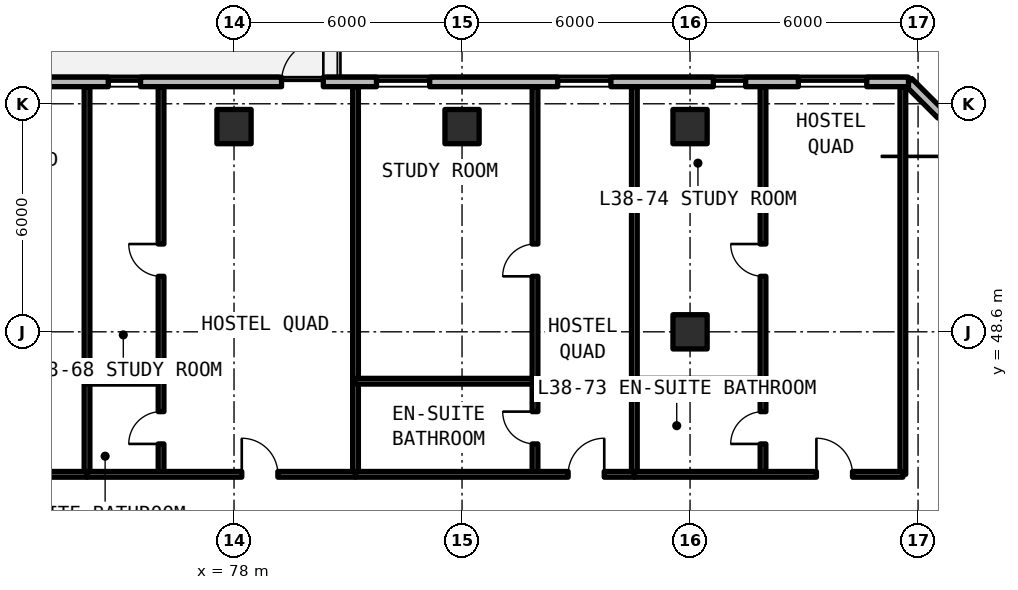
"""IFC4 building model, lengths in metres.
Left out: names, types, materials, properties, quantities, classifications, styles, units other than length and angle.
Written with IfcOpenShell. Run it as: python <this file> out.ifc"""

import sys

from ifc_helpers import new_model, si_unit, direction, frame, frame_2d, origin, origin_2d, place, context, subcontext, project, spatial, rectangle, extrude, element, fill, save


model = new_model("IFC4")
c1 = context("Model", 3, precision=1e-05, world=origin(), true_north=direction((0.0, 1.0)))
c2 = subcontext(c1, "Body", "Model", "MODEL_VIEW")
j1 = project(units=[si_unit("LENGTHUNIT", "METRE"), si_unit("PLANEANGLEUNIT", "RADIAN")], contexts=[c1])
p1 = place(None, origin())
s1 = spatial("IfcSite", under=j1, at=p1, CompositionType="ELEMENT")
p2 = place(p1, origin())
s2 = spatial("IfcBuilding", under=s1, at=p2, CompositionType="ELEMENT")
p3 = place(p2, frame((0.0, 0.0, 138.6)))
s3 = spatial("IfcBuildingStorey", under=s2, at=p3, CompositionType="ELEMENT", Elevation=138.6)
for number, where, z_axis, x_axis in (
    (1, (90.0, 48.6, 0.0), (0.0, 0.0, 1.0), (1.0, 0.0, 0.0)),
    (2, (78.0, 54.0, 0.0), (0.0, 0.0, 1.0), (1.0, 0.0, 0.0)),
    (3, (84.0, 54.0, 0.0), (0.0, 0.0, 1.0), (1.0, 0.0, 0.0)),
    (4, (90.0, 54.0, 0.0), (0.0, 0.0, 1.0), (1.0, 0.0, 0.0)),
):
    element("IfcColumn", number, at=place(p3, frame(where, z_axis=z_axis, x_axis=x_axis)), inside=s3, PredefinedType="COLUMN", context=c2, shape_type="SweptSolid", body=[
        extrude(rectangle(XDim=0.9, YDim=0.9, at=origin_2d()), origin(), (0.0, 0.0, 1.0), 3.3),
    ])
p4 = place(p3, frame((99.875, 51.048, 0.0), z_axis=(0.0, 0.0, 1.0), x_axis=(-0.70708586489, 0.707127696864, 0.0)))
e5 = element("IfcWall", 5, at=p4, inside=s3, PredefinedType="SOLIDWALL", context=c2, shape_type="SweptSolid", body=[
    extrude(rectangle(XDim=5.836, YDim=0.25, at=frame_2d((2.918, 0.0))), origin(), (0.0, 0.0, 1.0), 3.08),
])
p5 = place(p4, frame((1.218, 0.0, 0.78)))
e6 = element("IfcOpeningElement", 6, at=p5, cuts=e5, PredefinedType="OPENING", context=c2, shape_type="SweptSolid", body=[
    extrude(rectangle(XDim=3.4, YDim=1.66, at=frame_2d((1.7, 0.83))), frame((0.0, 0.135, 0.0), z_axis=(0.0, -1.0, 0.0), x_axis=(1.0, 0.0, 0.0)), (0.0, 0.0, 1.0), 0.27),
])
p6 = place(p3, frame((95.748, 55.175, 0.0), z_axis=(0.0, 0.0, 1.0), x_axis=(-1.0, 0.0, 0.0)))
e7 = element("IfcWall", 7, at=p6, inside=s3, PredefinedType="SOLIDWALL", context=c2, shape_type="SweptSolid", body=[
    extrude(rectangle(XDim=43.623, YDim=0.25, at=frame_2d((21.812, 0.0))), origin(), (0.0, 0.0, 1.0), 3.08),
])
p7 = place(p6, frame((31.598, 0.0, 0.0)))
e8 = element("IfcOpeningElement", 8, at=p7, cuts=e7, PredefinedType="OPENING", context=c2, shape_type="SweptSolid", body=[
    extrude(rectangle(XDim=1.1, YDim=2.15, at=frame_2d((0.55, 1.075))), frame((0.0, 0.135, 0.0), z_axis=(0.0, -1.0, 0.0), x_axis=(1.0, 0.0, 0.0)), (0.0, 0.0, 1.0), 0.27),
])
p8 = place(p6, frame((15.398, 0.0, 0.0)))
e9 = element("IfcOpeningElement", 9, at=p8, cuts=e7, PredefinedType="OPENING", context=c2, shape_type="SweptSolid", body=[
    extrude(rectangle(XDim=1.1, YDim=2.15, at=frame_2d((0.55, 1.075))), frame((0.0, 0.135, 0.0), z_axis=(0.0, -1.0, 0.0), x_axis=(1.0, 0.0, 0.0)), (0.0, 0.0, 1.0), 0.27),
])
p9 = place(p6, frame((40.333, 0.0, 0.78)))
e10 = element("IfcOpeningElement", 10, at=p9, cuts=e7, PredefinedType="OPENING", context=c2, shape_type="SweptSolid", body=[
    extrude(rectangle(XDim=0.85, YDim=1.65, at=frame_2d((0.425, 0.825))), frame((0.0, 0.135, 0.0), z_axis=(0.0, -1.0, 0.0), x_axis=(1.0, 0.0, 0.0)), (0.0, 0.0, 1.0), 0.27),
])
p10 = place(p6, frame((37.17, 0.0, 0.78)))
e11 = element("IfcOpeningElement", 11, at=p10, cuts=e7, PredefinedType="OPENING", context=c2, shape_type="SweptSolid", body=[
    extrude(rectangle(XDim=1.8, YDim=1.66, at=frame_2d((0.9, 0.83))), frame((0.0, 0.135, 0.0), z_axis=(0.0, -1.0, 0.0), x_axis=(1.0, 0.0, 0.0)), (0.0, 0.0, 1.0), 0.27),
])
p11 = place(p6, frame((27.615, 0.0, 0.78)))
e12 = element("IfcOpeningElement", 12, at=p11, cuts=e7, PredefinedType="OPENING", context=c2, shape_type="SweptSolid", body=[
    extrude(rectangle(XDim=0.85, YDim=1.65, at=frame_2d((0.425, 0.825))), frame((0.0, 0.135, 0.0), z_axis=(0.0, -1.0, 0.0), x_axis=(1.0, 0.0, 0.0)), (0.0, 0.0, 1.0), 0.27),
])
p12 = place(p6, frame((24.516, 0.0, 0.78)))
e13 = element("IfcOpeningElement", 13, at=p12, cuts=e7, PredefinedType="OPENING", context=c2, shape_type="SweptSolid", body=[
    extrude(rectangle(XDim=1.4, YDim=1.65, at=frame_2d((0.7, 0.825))), frame((0.0, 0.135, 0.0), z_axis=(0.0, -1.0, 0.0), x_axis=(1.0, 0.0, 0.0)), (0.0, 0.0, 1.0), 0.27),
])
p13 = place(p6, frame((20.208, 0.0, 0.78)))
e14 = element("IfcOpeningElement", 14, at=p13, cuts=e7, PredefinedType="OPENING", context=c2, shape_type="SweptSolid", body=[
    extrude(rectangle(XDim=0.85, YDim=1.65, at=frame_2d((0.425, 0.825))), frame((0.0, 0.135, 0.0), z_axis=(0.0, -1.0, 0.0), x_axis=(1.0, 0.0, 0.0)), (0.0, 0.0, 1.0), 0.27),
])
p14 = place(p6, frame((12.6, 0.0, 0.78)))
e15 = element("IfcOpeningElement", 15, at=p14, cuts=e7, PredefinedType="OPENING", context=c2, shape_type="SweptSolid", body=[
    extrude(rectangle(XDim=1.4, YDim=1.65, at=frame_2d((0.7, 0.825))), frame((0.0, 0.135, 0.0), z_axis=(0.0, -1.0, 0.0), x_axis=(1.0, 0.0, 0.0)), (0.0, 0.0, 1.0), 0.27),
])
p15 = place(p6, frame((7.831, 0.0, 0.78)))
e16 = element("IfcOpeningElement", 16, at=p15, cuts=e7, PredefinedType="OPENING", context=c2, shape_type="SweptSolid", body=[
    extrude(rectangle(XDim=1.4, YDim=1.65, at=frame_2d((0.7, 0.825))), frame((0.0, 0.135, 0.0), z_axis=(0.0, -1.0, 0.0), x_axis=(1.0, 0.0, 0.0)), (0.0, 0.0, 1.0), 0.27),
])
p16 = place(p6, frame((4.286, 0.0, 0.78)))
e17 = element("IfcOpeningElement", 17, at=p16, cuts=e7, PredefinedType="OPENING", context=c2, shape_type="SweptSolid", body=[
    extrude(rectangle(XDim=0.85, YDim=1.65, at=frame_2d((0.425, 0.825))), frame((0.0, 0.135, 0.0), z_axis=(0.0, -1.0, 0.0), x_axis=(1.0, 0.0, 0.0)), (0.0, 0.0, 1.0), 0.27),
])
p17 = place(p6, frame((1.098, 0.0, 0.78)))
e18 = element("IfcOpeningElement", 18, at=p17, cuts=e7, PredefinedType="OPENING", context=c2, shape_type="SweptSolid", body=[
    extrude(rectangle(XDim=1.8, YDim=1.66, at=frame_2d((0.9, 0.83))), frame((0.0, 0.135, 0.0), z_axis=(0.0, -1.0, 0.0), x_axis=(1.0, 0.0, 0.0)), (0.0, 0.0, 1.0), 0.27),
])
for number, where, z_axis, x_axis in (
    (19, (95.6, 44.85, 0.0), (0.0, 0.0, 1.0), (0.0, 1.0, 0.0)),
    (20, (74.132, 44.85, 0.0), (0.0, 0.0, 1.0), (0.0, 1.0, 0.0)),
):
    element("IfcWall", number, at=place(p3, frame(where, z_axis=z_axis, x_axis=x_axis)), inside=s3, PredefinedType="SOLIDWALL", context=c2, shape_type="SweptSolid", body=[
        extrude(rectangle(XDim=10.2, YDim=0.15, at=frame_2d((5.1, 0.0))), origin(), (0.0, 0.0, 1.0), 2.35),
    ])
p18 = place(p3, frame((66.523, 44.85, 0.0), z_axis=(0.0, 0.0, 1.0), x_axis=(1.0, 0.0, 0.0)))
e21 = element("IfcWall", 21, at=p18, inside=s3, PredefinedType="SOLIDWALL", context=c2, shape_type="SweptSolid", body=[
    extrude(rectangle(XDim=7.609, YDim=0.15, at=frame_2d((3.804, 0.0))), origin(), (0.0, 0.0, 1.0), 2.35),
])
p19 = place(p18, frame((4.544, 0.0, 0.0)))
e22 = element("IfcOpeningElement", 22, at=p19, cuts=e21, PredefinedType="OPENING", context=c2, shape_type="SweptSolid", body=[
    extrude(rectangle(XDim=0.95, YDim=2.15, at=frame_2d((0.475, 1.075))), frame((0.0, 0.085, 0.0), z_axis=(0.0, -1.0, 0.0), x_axis=(1.0, 0.0, 0.0)), (0.0, 0.0, 1.0), 0.17),
])
p20 = place(p3, frame((81.197, 44.85, 0.0), z_axis=(0.0, 0.0, 1.0), x_axis=(0.0, 1.0, 0.0)))
e23 = element("IfcWall", 23, at=p20, inside=s3, PredefinedType="SOLIDWALL", context=c2, shape_type="SweptSolid", body=[
    extrude(rectangle(XDim=10.2, YDim=0.15, at=frame_2d((5.1, 0.0))), origin(), (0.0, 0.0, 1.0), 2.35),
])
p21 = place(p3, frame((74.132, 47.3, 0.0), z_axis=(0.0, 0.0, 1.0), x_axis=(1.0, 0.0, 0.0)))
e24 = element("IfcWall", 24, at=p21, inside=s3, PredefinedType="PARTITIONING", context=c2, shape_type="SweptSolid", body=[
    extrude(rectangle(XDim=1.948, YDim=0.15, at=frame_2d((0.974, 0.0))), origin(), (0.0, 0.0, 1.0), 2.35),
])
p22 = place(p3, frame((76.08, 44.85, 0.0), z_axis=(0.0, 0.0, 1.0), x_axis=(0.0, 1.0, 0.0)))
e25 = element("IfcWall", 25, at=p22, inside=s3, PredefinedType="PARTITIONING", context=c2, shape_type="SweptSolid", body=[
    extrude(rectangle(XDim=10.2, YDim=0.15, at=frame_2d((5.1, 0.0))), origin(), (0.0, 0.0, 1.0), 2.35),
])
p23 = place(p22, frame((0.8, 0.0, 0.0)))
e26 = element("IfcOpeningElement", 26, at=p23, cuts=e25, PredefinedType="OPENING", context=c2, shape_type="SweptSolid", body=[
    extrude(rectangle(XDim=0.85, YDim=2.1, at=frame_2d((0.425, 1.05))), frame((0.0, 0.085, 0.0), z_axis=(0.0, -1.0, 0.0), x_axis=(1.0, 0.0, 0.0)), (0.0, 0.0, 1.0), 0.17),
])
p24 = place(p22, frame((5.21, 0.0, 0.0)))
e27 = element("IfcOpeningElement", 27, at=p24, cuts=e25, PredefinedType="OPENING", context=c2, shape_type="SweptSolid", body=[
    extrude(rectangle(XDim=0.85, YDim=2.1, at=frame_2d((0.425, 1.05))), frame((0.0, 0.085, 0.0), z_axis=(0.0, -1.0, 0.0), x_axis=(1.0, 0.0, 0.0)), (0.0, 0.0, 1.0), 0.17),
])
p25 = place(p3, frame((74.132, 44.85, 0.0), z_axis=(0.0, 0.0, 1.0), x_axis=(1.0, 0.0, 0.0)))
e28 = element("IfcWall", 28, at=p25, inside=s3, PredefinedType="SOLIDWALL", context=c2, shape_type="SweptSolid", body=[
    extrude(rectangle(XDim=7.066, YDim=0.15, at=frame_2d((3.533, 0.0))), origin(), (0.0, 0.0, 1.0), 2.35),
])
p26 = place(p25, frame((4.072, 0.0, 0.0)))
e29 = element("IfcOpeningElement", 29, at=p26, cuts=e28, PredefinedType="OPENING", context=c2, shape_type="SweptSolid", body=[
    extrude(rectangle(XDim=0.95, YDim=2.15, at=frame_2d((0.475, 1.075))), frame((0.0, 0.085, 0.0), z_axis=(0.0, -1.0, 0.0), x_axis=(1.0, 0.0, 0.0)), (0.0, 0.0, 1.0), 0.17),
])
p27 = place(p3, frame((88.534, 44.85, 0.0), z_axis=(0.0, 0.0, 1.0), x_axis=(0.0, 1.0, 0.0)))
e30 = element("IfcWall", 30, at=p27, inside=s3, PredefinedType="SOLIDWALL", context=c2, shape_type="SweptSolid", body=[
    extrude(rectangle(XDim=10.2, YDim=0.15, at=frame_2d((5.1, 0.0))), origin(), (0.0, 0.0, 1.0), 2.35),
])
p28 = place(p3, frame((81.197, 47.3, 0.0), z_axis=(0.0, 0.0, 1.0), x_axis=(1.0, 0.0, 0.0)))
e31 = element("IfcWall", 31, at=p28, inside=s3, PredefinedType="PARTITIONING", context=c2, shape_type="SweptSolid", body=[
    extrude(rectangle(XDim=4.723, YDim=0.15, at=frame_2d((2.361, 0.0))), origin(), (0.0, 0.0, 1.0), 2.35),
])
p29 = place(p3, frame((85.92, 44.85, 0.0), z_axis=(0.0, 0.0, 1.0), x_axis=(0.0, 1.0, 0.0)))
e32 = element("IfcWall", 32, at=p29, inside=s3, PredefinedType="PARTITIONING", context=c2, shape_type="SweptSolid", body=[
    extrude(rectangle(XDim=10.2, YDim=0.15, at=frame_2d((5.1, 0.0))), origin(), (0.0, 0.0, 1.0), 2.35),
])
p30 = place(p29, frame((0.8, 0.0, 0.0)))
e33 = element("IfcOpeningElement", 33, at=p30, cuts=e32, PredefinedType="OPENING", context=c2, shape_type="SweptSolid", body=[
    extrude(rectangle(XDim=0.85, YDim=2.1, at=frame_2d((0.425, 1.05))), frame((0.0, 0.085, 0.0), z_axis=(0.0, -1.0, 0.0), x_axis=(1.0, 0.0, 0.0)), (0.0, 0.0, 1.0), 0.17),
])
p31 = place(p29, frame((5.21, 0.0, 0.0)))
e34 = element("IfcOpeningElement", 34, at=p31, cuts=e32, PredefinedType="OPENING", context=c2, shape_type="SweptSolid", body=[
    extrude(rectangle(XDim=0.85, YDim=2.1, at=frame_2d((0.425, 1.05))), frame((0.0, 0.085, 0.0), z_axis=(0.0, -1.0, 0.0), x_axis=(1.0, 0.0, 0.0)), (0.0, 0.0, 1.0), 0.17),
])
p32 = place(p3, frame((81.197, 44.85, 0.0), z_axis=(0.0, 0.0, 1.0), x_axis=(1.0, 0.0, 0.0)))
e35 = element("IfcWall", 35, at=p32, inside=s3, PredefinedType="SOLIDWALL", context=c2, shape_type="SweptSolid", body=[
    extrude(rectangle(XDim=7.337, YDim=0.15, at=frame_2d((3.668, 0.0))), origin(), (0.0, 0.0, 1.0), 2.35),
])
p33 = place(p32, frame((5.595, 0.0, 0.0)))
e36 = element("IfcOpeningElement", 36, at=p33, cuts=e35, PredefinedType="OPENING", context=c2, shape_type="SweptSolid", body=[
    extrude(rectangle(XDim=0.95, YDim=2.15, at=frame_2d((0.475, 1.075))), frame((0.0, 0.085, 0.0), z_axis=(0.0, -1.0, 0.0), x_axis=(1.0, 0.0, 0.0)), (0.0, 0.0, 1.0), 0.17),
])
p34 = place(p3, frame((88.534, 47.3, 0.0), z_axis=(0.0, 0.0, 1.0), x_axis=(1.0, 0.0, 0.0)))
e37 = element("IfcWall", 37, at=p34, inside=s3, PredefinedType="PARTITIONING", context=c2, shape_type="SweptSolid", body=[
    extrude(rectangle(XDim=3.385, YDim=0.15, at=frame_2d((1.693, 0.0))), origin(), (0.0, 0.0, 1.0), 2.35),
])
p35 = place(p3, frame((91.92, 44.85, 0.0), z_axis=(0.0, 0.0, 1.0), x_axis=(0.0, 1.0, 0.0)))
e38 = element("IfcWall", 38, at=p35, inside=s3, PredefinedType="PARTITIONING", context=c2, shape_type="SweptSolid", body=[
    extrude(rectangle(XDim=10.2, YDim=0.15, at=frame_2d((5.1, 0.0))), origin(), (0.0, 0.0, 1.0), 2.35),
])
p36 = place(p35, frame((0.8, 0.0, 0.0)))
e39 = element("IfcOpeningElement", 39, at=p36, cuts=e38, PredefinedType="OPENING", context=c2, shape_type="SweptSolid", body=[
    extrude(rectangle(XDim=0.85, YDim=2.1, at=frame_2d((0.425, 1.05))), frame((0.0, 0.085, 0.0), z_axis=(0.0, -1.0, 0.0), x_axis=(1.0, 0.0, 0.0)), (0.0, 0.0, 1.0), 0.17),
])
p37 = place(p35, frame((5.21, 0.0, 0.0)))
e40 = element("IfcOpeningElement", 40, at=p37, cuts=e38, PredefinedType="OPENING", context=c2, shape_type="SweptSolid", body=[
    extrude(rectangle(XDim=0.85, YDim=2.1, at=frame_2d((0.425, 1.05))), frame((0.0, 0.085, 0.0), z_axis=(0.0, -1.0, 0.0), x_axis=(1.0, 0.0, 0.0)), (0.0, 0.0, 1.0), 0.17),
])
p38 = place(p3, frame((88.534, 44.85, 0.0), z_axis=(0.0, 0.0, 1.0), x_axis=(1.0, 0.0, 0.0)))
e41 = element("IfcWall", 41, at=p38, inside=s3, PredefinedType="SOLIDWALL", context=c2, shape_type="SweptSolid", body=[
    extrude(rectangle(XDim=7.066, YDim=0.15, at=frame_2d((3.533, 0.0))), origin(), (0.0, 0.0, 1.0), 2.35),
])
p39 = place(p38, frame((4.791, 0.0, 0.0)))
e42 = element("IfcOpeningElement", 42, at=p39, cuts=e41, PredefinedType="OPENING", context=c2, shape_type="SweptSolid", body=[
    extrude(rectangle(XDim=0.95, YDim=2.15, at=frame_2d((0.475, 1.075))), frame((0.0, 0.085, 0.0), z_axis=(0.0, -1.0, 0.0), x_axis=(1.0, 0.0, 0.0)), (0.0, 0.0, 1.0), 0.17),
])
p40 = place(p8, frame((1.1, 0.0, 0.0), z_axis=(0.0, 0.0, 1.0), x_axis=(-1.0, 0.0, 0.0)))
e43 = element("IfcDoor", 43, at=p40, inside=s3, OperationType="SINGLE_SWING_LEFT", PredefinedType="DOOR", context=c2, shape_type="SweptSolid", body=[
    extrude(rectangle(XDim=1.1, YDim=2.15, at=frame_2d((0.55, 1.075))), frame((0.0, 0.025, 0.0), z_axis=(0.0, -1.0, 0.0), x_axis=(1.0, 0.0, 0.0)), (0.0, 0.0, 1.0), 0.05),
])
fill(e9, e43)
p41 = place(p13, origin())
e44 = element("IfcWindow", 44, at=p41, inside=s3, PartitioningType="SINGLE_PANEL", PredefinedType="WINDOW", context=c2, shape_type="SweptSolid", body=[
    extrude(rectangle(XDim=0.85, YDim=1.65, at=frame_2d((0.425, 0.825))), frame((0.0, 0.03, 0.0), z_axis=(0.0, -1.0, 0.0), x_axis=(1.0, 0.0, 0.0)), (0.0, 0.0, 1.0), 0.06),
])
fill(e14, e44)
p42 = place(p14, origin())
e45 = element("IfcWindow", 45, at=p42, inside=s3, PartitioningType="SINGLE_PANEL", PredefinedType="WINDOW", context=c2, shape_type="SweptSolid", body=[
    extrude(rectangle(XDim=1.4, YDim=1.65, at=frame_2d((0.7, 0.825))), frame((0.0, 0.03, 0.0), z_axis=(0.0, -1.0, 0.0), x_axis=(1.0, 0.0, 0.0)), (0.0, 0.0, 1.0), 0.06),
])
fill(e15, e45)
p43 = place(p15, origin())
e46 = element("IfcWindow", 46, at=p43, inside=s3, PartitioningType="SINGLE_PANEL", PredefinedType="WINDOW", context=c2, shape_type="SweptSolid", body=[
    extrude(rectangle(XDim=1.4, YDim=1.65, at=frame_2d((0.7, 0.825))), frame((0.0, 0.03, 0.0), z_axis=(0.0, -1.0, 0.0), x_axis=(1.0, 0.0, 0.0)), (0.0, 0.0, 1.0), 0.06),
])
fill(e16, e46)
p44 = place(p16, origin())
e47 = element("IfcWindow", 47, at=p44, inside=s3, PartitioningType="SINGLE_PANEL", PredefinedType="WINDOW", context=c2, shape_type="SweptSolid", body=[
    extrude(rectangle(XDim=0.85, YDim=1.65, at=frame_2d((0.425, 0.825))), frame((0.0, 0.03, 0.0), z_axis=(0.0, -1.0, 0.0), x_axis=(1.0, 0.0, 0.0)), (0.0, 0.0, 1.0), 0.06),
])
fill(e17, e47)
p45 = place(p17, origin())
e48 = element("IfcWindow", 48, at=p45, inside=s3, PartitioningType="SINGLE_PANEL", PredefinedType="WINDOW", context=c2, shape_type="SweptSolid", body=[
    extrude(rectangle(XDim=1.8, YDim=1.66, at=frame_2d((0.9, 0.83))), frame((0.0, 0.03, 0.0), z_axis=(0.0, -1.0, 0.0), x_axis=(1.0, 0.0, 0.0)), (0.0, 0.0, 1.0), 0.06),
])
fill(e18, e48)
p46 = place(p23, origin())
e49 = element("IfcDoor", 49, at=p46, inside=s3, OperationType="SINGLE_SWING_LEFT", PredefinedType="DOOR", context=c2, shape_type="SweptSolid", body=[
    extrude(rectangle(XDim=0.85, YDim=2.1, at=frame_2d((0.425, 1.05))), frame((0.0, 0.025, 0.0), z_axis=(0.0, -1.0, 0.0), x_axis=(1.0, 0.0, 0.0)), (0.0, 0.0, 1.0), 0.05),
])
fill(e26, e49)
p47 = place(p24, origin())
e50 = element("IfcDoor", 50, at=p47, inside=s3, OperationType="SINGLE_SWING_RIGHT", PredefinedType="DOOR", context=c2, shape_type="SweptSolid", body=[
    extrude(rectangle(XDim=0.85, YDim=2.1, at=frame_2d((0.425, 1.05))), frame((0.0, 0.025, 0.0), z_axis=(0.0, -1.0, 0.0), x_axis=(1.0, 0.0, 0.0)), (0.0, 0.0, 1.0), 0.05),
])
fill(e27, e50)
p48 = place(p26, origin())
e51 = element("IfcDoor", 51, at=p48, inside=s3, OperationType="SINGLE_SWING_LEFT", PredefinedType="DOOR", context=c2, shape_type="SweptSolid", body=[
    extrude(rectangle(XDim=0.95, YDim=2.15, at=frame_2d((0.475, 1.075))), frame((0.0, 0.025, 0.0), z_axis=(0.0, -1.0, 0.0), x_axis=(1.0, 0.0, 0.0)), (0.0, 0.0, 1.0), 0.05),
])
fill(e29, e51)
p49 = place(p30, origin())
e52 = element("IfcDoor", 52, at=p49, inside=s3, OperationType="SINGLE_SWING_RIGHT", PredefinedType="DOOR", context=c2, shape_type="SweptSolid", body=[
    extrude(rectangle(XDim=0.85, YDim=2.1, at=frame_2d((0.425, 1.05))), frame((0.0, 0.025, 0.0), z_axis=(0.0, -1.0, 0.0), x_axis=(1.0, 0.0, 0.0)), (0.0, 0.0, 1.0), 0.05),
])
fill(e33, e52)
p50 = place(p31, origin())
e53 = element("IfcDoor", 53, at=p50, inside=s3, OperationType="SINGLE_SWING_LEFT", PredefinedType="DOOR", context=c2, shape_type="SweptSolid", body=[
    extrude(rectangle(XDim=0.85, YDim=2.1, at=frame_2d((0.425, 1.05))), frame((0.0, 0.025, 0.0), z_axis=(0.0, -1.0, 0.0), x_axis=(1.0, 0.0, 0.0)), (0.0, 0.0, 1.0), 0.05),
])
fill(e34, e53)
p51 = place(p33, origin())
e54 = element("IfcDoor", 54, at=p51, inside=s3, OperationType="SINGLE_SWING_RIGHT", PredefinedType="DOOR", context=c2, shape_type="SweptSolid", body=[
    extrude(rectangle(XDim=0.95, YDim=2.15, at=frame_2d((0.475, 1.075))), frame((0.0, 0.025, 0.0), z_axis=(0.0, -1.0, 0.0), x_axis=(1.0, 0.0, 0.0)), (0.0, 0.0, 1.0), 0.05),
])
fill(e36, e54)
p52 = place(p36, origin())
e55 = element("IfcDoor", 55, at=p52, inside=s3, OperationType="SINGLE_SWING_LEFT", PredefinedType="DOOR", context=c2, shape_type="SweptSolid", body=[
    extrude(rectangle(XDim=0.85, YDim=2.1, at=frame_2d((0.425, 1.05))), frame((0.0, 0.025, 0.0), z_axis=(0.0, -1.0, 0.0), x_axis=(1.0, 0.0, 0.0)), (0.0, 0.0, 1.0), 0.05),
])
fill(e39, e55)
p53 = place(p37, origin())
e56 = element("IfcDoor", 56, at=p53, inside=s3, OperationType="SINGLE_SWING_RIGHT", PredefinedType="DOOR", context=c2, shape_type="SweptSolid", body=[
    extrude(rectangle(XDim=0.85, YDim=2.1, at=frame_2d((0.425, 1.05))), frame((0.0, 0.025, 0.0), z_axis=(0.0, -1.0, 0.0), x_axis=(1.0, 0.0, 0.0)), (0.0, 0.0, 1.0), 0.05),
])
fill(e40, e56)
p54 = place(p39, origin())
e57 = element("IfcDoor", 57, at=p54, inside=s3, OperationType="SINGLE_SWING_LEFT", PredefinedType="DOOR", context=c2, shape_type="SweptSolid", body=[
    extrude(rectangle(XDim=0.95, YDim=2.15, at=frame_2d((0.475, 1.075))), frame((0.0, 0.025, 0.0), z_axis=(0.0, -1.0, 0.0), x_axis=(1.0, 0.0, 0.0)), (0.0, 0.0, 1.0), 0.05),
])
fill(e42, e57)
save(model, sys.argv[1])
